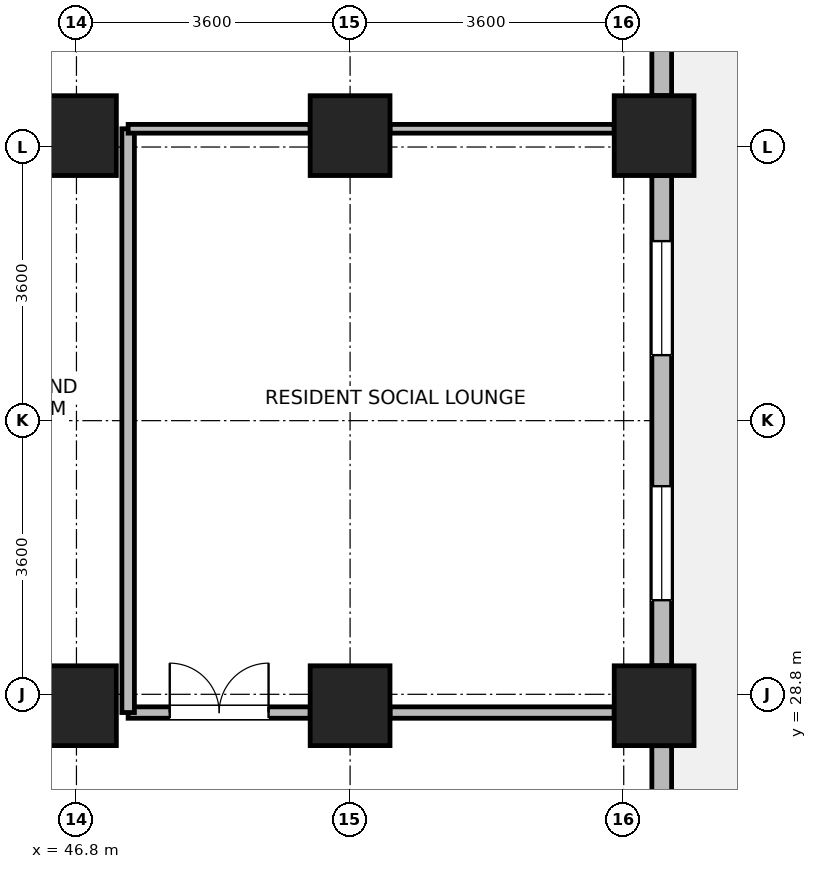
"""IFC4 building model, lengths in metres.
Left out: names, types, materials, properties, quantities, classifications, styles, units other than length and angle.
Written with IfcOpenShell. Run it as: python <this file> out.ifc"""

import sys

from ifc_helpers import new_model, si_unit, direction, frame, frame_2d, origin, origin_2d, place, context, subcontext, project, spatial, rectangle, extrude, source, transform, mapped, element, fill, save


model = new_model("IFC4")
c1 = context("Model", 3, precision=1e-05, world=origin(), true_north=direction((0.0, 1.0)))
c2 = subcontext(c1, "Body", "Model", "MODEL_VIEW")
j1 = project(units=[si_unit("LENGTHUNIT", "METRE"), si_unit("PLANEANGLEUNIT", "RADIAN")], contexts=[c1])
p1 = place(None, origin())
s1 = spatial("IfcSite", under=j1, at=p1, CompositionType="ELEMENT")
p2 = place(p1, origin())
s2 = spatial("IfcBuilding", under=s1, at=p2, CompositionType="ELEMENT")
p3 = place(p2, frame((0.0, 0.0, 177.2)))
s3 = spatial("IfcBuildingStorey", under=s2, at=p3, CompositionType="ELEMENT", Elevation=177.2)
m1 = source(origin(), c2, "Body", "SweptSolid", [
    extrude(rectangle(XDim=1.05, YDim=1.05, at=origin_2d()), origin(), (0.0, 0.0, 1.0), 3.7),
])
for number, where, z_axis, x_axis in (
    (1, (46.8, 28.65, 0.0), (0.0, 0.0, 1.0), (1.0, 0.0, 0.0)),
    (2, (46.8, 36.15, 0.0), (0.0, 0.0, 1.0), (1.0, 0.0, 0.0)),
    (3, (50.4, 28.65, 0.0), (0.0, 0.0, 1.0), (1.0, 0.0, 0.0)),
    (4, (50.4, 36.15, 0.0), (0.0, 0.0, 1.0), (1.0, 0.0, 0.0)),
    (5, (54.4, 28.65, 0.0), (0.0, 0.0, 1.0), (1.0, 0.0, 0.0)),
    (6, (54.4, 36.15, 0.0), (0.0, 0.0, 1.0), (1.0, 0.0, 0.0)),
):
    element("IfcColumn", number, at=place(p3, frame(where, z_axis=z_axis, x_axis=x_axis)), inside=s3, PredefinedType="COLUMN", context=c2, shape_type="MappedRepresentation", body=[
        mapped(m1, transform((0.0, 0.0, 0.0), x_axis=(1.0, 0.0, 0.0), y_axis=(0.0, 1.0, 0.0), z_axis=(0.0, 0.0, 1.0), scale=1.0)),
    ])
p4 = place(p3, frame((54.5, 28.124, 0.0), z_axis=(0.0, 0.0, 1.0), x_axis=(0.0, -1.0, 0.0)))
e7 = element("IfcWall", 7, at=p4, inside=s3, PredefinedType="STANDARD", context=c2, shape_type="SweptSolid", body=[
    extrude(rectangle(XDim=5.998, YDim=0.26, at=frame_2d((2.999, 0.0))), origin(), (0.0, 0.0, 1.0), 2.99),
])
p5 = place(p4, frame((3.749, 0.0, 0.85)))
e8 = element("IfcOpeningElement", 8, at=p5, cuts=e7, PredefinedType="OPENING", context=c2, shape_type="SweptSolid", body=[
    extrude(rectangle(XDim=1.5, YDim=1.85, at=frame_2d((0.75, 0.925))), frame((0.0, 0.14, 0.0), z_axis=(0.0, -1.0, 0.0), x_axis=(1.0, 0.0, 0.0)), (0.0, 0.0, 1.0), 0.28),
])
p6 = place(p4, frame((2.044, 0.0, 0.85)))
e9 = element("IfcOpeningElement", 9, at=p6, cuts=e7, PredefinedType="OPENING", context=c2, shape_type="SweptSolid", body=[
    extrude(rectangle(XDim=0.95, YDim=1.75, at=frame_2d((0.475, 0.875))), frame((0.0, 0.14, 0.0), z_axis=(0.0, -1.0, 0.0), x_axis=(1.0, 0.0, 0.0)), (0.0, 0.0, 1.0), 0.28),
])
p7 = place(p3, frame((54.5, 35.624, 0.0), z_axis=(0.0, 0.0, 1.0), x_axis=(0.0, -1.0, 0.0)))
e10 = element("IfcWall", 10, at=p7, inside=s3, PredefinedType="STANDARD", context=c2, shape_type="SweptSolid", body=[
    extrude(rectangle(XDim=6.448, YDim=0.26, at=frame_2d((3.224, 0.0))), origin(), (0.0, 0.0, 1.0), 2.99),
])
p8 = place(p7, frame((0.862, 0.0, 0.85)))
e11 = element("IfcOpeningElement", 11, at=p8, cuts=e10, PredefinedType="OPENING", context=c2, shape_type="SweptSolid", body=[
    extrude(rectangle(XDim=1.5, YDim=1.85, at=frame_2d((0.75, 0.925))), frame((0.0, 0.14, 0.0), z_axis=(0.0, -1.0, 0.0), x_axis=(1.0, 0.0, 0.0)), (0.0, 0.0, 1.0), 0.28),
])
p9 = place(p7, frame((4.086, 0.0, 0.85)))
e12 = element("IfcOpeningElement", 12, at=p9, cuts=e10, PredefinedType="OPENING", context=c2, shape_type="SweptSolid", body=[
    extrude(rectangle(XDim=1.5, YDim=1.85, at=frame_2d((0.75, 0.925))), frame((0.0, 0.14, 0.0), z_axis=(0.0, -1.0, 0.0), x_axis=(1.0, 0.0, 0.0)), (0.0, 0.0, 1.0), 0.28),
])
p10 = place(p3, frame((54.5, 39.73, 0.0), z_axis=(0.0, 0.0, 1.0), x_axis=(0.0, -1.0, 0.0)))
e13 = element("IfcWall", 13, at=p10, inside=s3, PredefinedType="STANDARD", context=c2, shape_type="SweptSolid", body=[
    extrude(rectangle(XDim=3.054, YDim=0.26, at=frame_2d((1.527, 0.0))), origin(), (0.0, 0.0, 1.0), 3.44),
])
p11 = place(p10, frame((0.777, 0.0, 0.85)))
e14 = element("IfcOpeningElement", 14, at=p11, cuts=e13, PredefinedType="OPENING", context=c2, shape_type="SweptSolid", body=[
    extrude(rectangle(XDim=1.5, YDim=1.85, at=frame_2d((0.75, 0.925))), frame((0.0, 0.14, 0.0), z_axis=(0.0, -1.0, 0.0), x_axis=(1.0, 0.0, 0.0)), (0.0, 0.0, 1.0), 0.28),
])
p12 = place(p3, frame((47.48, 28.56, 0.0), z_axis=(0.0, 0.0, 1.0), x_axis=(1.0, 0.0, 0.0)))
e15 = element("IfcWall", 15, at=p12, inside=s3, PredefinedType="PARTITIONING", context=c2, shape_type="SweptSolid", body=[
    extrude(rectangle(XDim=2.395, YDim=0.15, at=frame_2d((1.198, 0.0))), origin(), (0.0, 0.0, 1.0), 2.84),
])
p13 = place(p12, frame((0.548, 0.0, 0.0)))
e16 = element("IfcOpeningElement", 16, at=p13, cuts=e15, PredefinedType="OPENING", context=c2, shape_type="SweptSolid", body=[
    extrude(rectangle(XDim=1.3, YDim=2.12, at=frame_2d((0.65, 1.06))), frame((0.0, 0.085, 0.0), z_axis=(0.0, -1.0, 0.0), x_axis=(1.0, 0.0, 0.0)), (0.0, 0.0, 1.0), 0.17),
])
p14 = place(p3, frame((50.925, 28.56, 0.0), z_axis=(0.0, 0.0, 1.0), x_axis=(1.0, 0.0, 0.0)))
e17 = element("IfcWall", 17, at=p14, inside=s3, PredefinedType="PARTITIONING", context=c2, shape_type="SweptSolid", body=[
    extrude(rectangle(XDim=2.95, YDim=0.15, at=frame_2d((1.475, 0.0))), origin(), (0.0, 0.0, 1.0), 2.84),
])
p15 = place(p3, frame((47.48, 28.56, 0.0), z_axis=(0.0, 0.0, 1.0), x_axis=(0.0, 1.0, 0.0)))
e18 = element("IfcWall", 18, at=p15, inside=s3, PredefinedType="PARTITIONING", context=c2, shape_type="SweptSolid", body=[
    extrude(rectangle(XDim=7.68, YDim=0.165, at=frame_2d((3.84, 0.0))), origin(), (0.0, 0.0, 1.0), 3.44),
])
p16 = place(p3, frame((47.48, 36.24, 0.0), z_axis=(0.0, 0.0, 1.0), x_axis=(1.0, 0.0, 0.0)))
e19 = element("IfcWall", 19, at=p16, inside=s3, PredefinedType="PARTITIONING", context=c2, shape_type="SweptSolid", body=[
    extrude(rectangle(XDim=2.395, YDim=0.115, at=frame_2d((1.198, 0.0))), origin(), (0.0, 0.0, 1.0), 2.84),
])
p17 = place(p3, frame((50.925, 36.24, 0.0), z_axis=(0.0, 0.0, 1.0), x_axis=(1.0, 0.0, 0.0)))
e20 = element("IfcWall", 20, at=p17, inside=s3, PredefinedType="PARTITIONING", context=c2, shape_type="SweptSolid", body=[
    extrude(rectangle(XDim=2.95, YDim=0.115, at=frame_2d((1.475, 0.0))), origin(), (0.0, 0.0, 1.0), 2.84),
])
p18 = place(p8, origin())
e21 = element("IfcWindow", 21, at=p18, inside=s3, PartitioningType="SINGLE_PANEL", PredefinedType="WINDOW", context=c2, shape_type="SweptSolid", body=[
    extrude(rectangle(XDim=1.5, YDim=1.85, at=frame_2d((0.75, 0.925))), frame((0.0, 0.03, 0.0), z_axis=(0.0, -1.0, 0.0), x_axis=(1.0, 0.0, 0.0)), (0.0, 0.0, 1.0), 0.06),
])
fill(e11, e21)
p19 = place(p9, origin())
e22 = element("IfcWindow", 22, at=p19, inside=s3, PartitioningType="SINGLE_PANEL", PredefinedType="WINDOW", context=c2, shape_type="SweptSolid", body=[
    extrude(rectangle(XDim=1.5, YDim=1.85, at=frame_2d((0.75, 0.925))), frame((0.0, 0.03, 0.0), z_axis=(0.0, -1.0, 0.0), x_axis=(1.0, 0.0, 0.0)), (0.0, 0.0, 1.0), 0.06),
])
fill(e12, e22)
p20 = place(p13, origin())
e23 = element("IfcDoor", 23, at=p20, inside=s3, OperationType="DOUBLE_DOOR_SINGLE_SWING", PredefinedType="DOOR", context=c2, shape_type="SweptSolid", body=[
    extrude(rectangle(XDim=1.3, YDim=2.12, at=frame_2d((0.65, 1.06))), frame((0.0, 0.025, 0.0), z_axis=(0.0, -1.0, 0.0), x_axis=(1.0, 0.0, 0.0)), (0.0, 0.0, 1.0), 0.05),
])
fill(e16, e23)
save(model, sys.argv[1])
